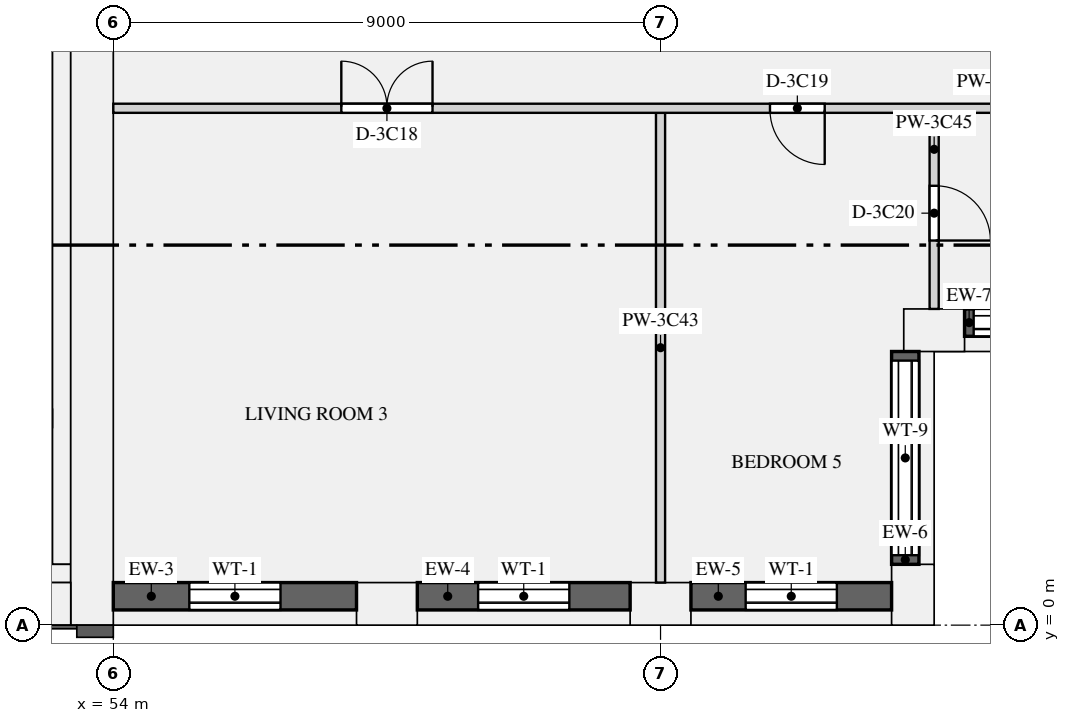
"""IFC4 building model, lengths in metres.
Left out: names, types, materials, properties, quantities, classifications, styles, units other than length and angle.
Written with IfcOpenShell. Run it as: python <this file> out.ifc"""

import sys

from ifc_helpers import new_model, si_unit, direction, frame, frame_2d, origin, origin_2d, place, context, subcontext, project, spatial, rectangle, extrude, element, fill, save


model = new_model("IFC4")
c1 = context("Model", 3, precision=1e-05, world=origin(), true_north=direction((0.0, 1.0)))
c2 = subcontext(c1, "Body", "Model", "MODEL_VIEW")
j1 = project(units=[si_unit("LENGTHUNIT", "METRE"), si_unit("PLANEANGLEUNIT", "RADIAN")], contexts=[c1])
p1 = place(None, origin())
s1 = spatial("IfcSite", under=j1, at=p1, CompositionType="ELEMENT")
p2 = place(p1, origin())
s2 = spatial("IfcBuilding", under=s1, at=p2, CompositionType="ELEMENT")
p3 = place(p2, frame((0.0, 0.0, 160.2)))
s3 = spatial("IfcBuildingStorey", under=s2, at=p3, CompositionType="ELEMENT", Elevation=160.2)
for number, where, z_axis, x_axis in (
    (1, (58.5, 0.35, 0.0), (0.0, 0.0, 1.0), (1.0, 0.0, 0.0)),
    (2, (63.0, 0.35, 0.0), (0.0, 0.0, 1.0), (1.0, 0.0, 0.0)),
    (3, (67.15, 0.5, 0.0), (0.0, 0.0, 1.0), (0.0, 1.0, 0.0)),
    (4, (67.5, 4.85, 0.0), (0.0, 0.0, 1.0), (1.0, 0.0, 0.0)),
):
    element("IfcColumn", number, at=place(p3, frame(where, z_axis=z_axis, x_axis=x_axis)), inside=s3, PredefinedType="USERDEFINED", context=c2, shape_type="SweptSolid", body=[
        extrude(rectangle(XDim=1.0, YDim=0.7, at=origin_2d()), origin(), (0.0, 0.0, 1.0), 3.15),
    ])
p4 = place(p3, frame((53.65, 0.0, 0.0), z_axis=(0.0, 0.0, 1.0), x_axis=(0.0, 1.0, 0.0)))
e5 = element("IfcWall", 5, at=p4, inside=s3, PredefinedType="SHEAR", context=c2, shape_type="SweptSolid", body=[
    extrude(rectangle(XDim=12.5, YDim=0.7, at=frame_2d((6.25, 0.0))), origin(), (0.0, 0.0, 1.0), 3.15),
])
p5 = place(p3, frame((18.7, 0.35, 0.0), z_axis=(0.0, 0.0, 1.0), x_axis=(1.0, 0.0, 0.0)))
e6 = element("IfcWall", 6, at=p5, inside=s3, PredefinedType="SHEAR", context=c2, shape_type="SweptSolid", body=[
    extrude(rectangle(XDim=34.6, YDim=0.7, at=frame_2d((17.3, 0.0))), origin(), (0.0, 0.0, 1.0), 3.15),
])
p6 = place(p3, frame((53.15, 1.0, 0.0), z_axis=(0.0, 0.0, 1.0), x_axis=(0.0, 1.0, 0.0)))
e7 = element("IfcWall", 7, at=p6, inside=s3, PredefinedType="SHEAR", context=c2, shape_type="SweptSolid", body=[
    extrude(rectangle(XDim=10.9, YDim=0.3, at=frame_2d((5.45, 0.0))), origin(), (0.0, 0.0, 1.0), 3.15),
])
p7 = place(p3, frame((18.7, 0.85, 0.0), z_axis=(0.0, 0.0, 1.0), x_axis=(1.0, 0.0, 0.0)))
e8 = element("IfcWall", 8, at=p7, inside=s3, PredefinedType="SHEAR", context=c2, shape_type="SweptSolid", body=[
    extrude(rectangle(XDim=34.6, YDim=0.3, at=frame_2d((17.3, 0.0))), origin(), (0.0, 0.0, 1.0), 3.15),
])
p8 = place(p3, frame((54.0, 0.475, 0.9), z_axis=(0.0, 0.0, 1.0), x_axis=(1.0, 0.0, 0.0)))
e9 = element("IfcWall", 9, at=p8, inside=s3, PredefinedType="SOLIDWALL", context=c2, shape_type="SweptSolid", body=[
    extrude(rectangle(XDim=4.0, YDim=0.45, at=frame_2d((2.0, 0.0))), origin(), (0.0, 0.0, 1.0), 1.93),
])
p9 = place(p8, frame((1.25, 0.0, 0.15)))
e10 = element("IfcOpeningElement", 10, at=p9, cuts=e9, PredefinedType="OPENING", context=c2, shape_type="SweptSolid", body=[
    extrude(rectangle(XDim=1.5, YDim=1.5, at=frame_2d((0.75, 0.75))), frame((0.0, 0.235, 0.0), z_axis=(0.0, -1.0, 0.0), x_axis=(1.0, 0.0, 0.0)), (0.0, 0.0, 1.0), 0.47),
])
p10 = place(p3, frame((59.0, 0.475, 0.9), z_axis=(0.0, 0.0, 1.0), x_axis=(1.0, 0.0, 0.0)))
e11 = element("IfcWall", 11, at=p10, inside=s3, PredefinedType="SOLIDWALL", context=c2, shape_type="SweptSolid", body=[
    extrude(rectangle(XDim=3.5, YDim=0.45, at=frame_2d((1.75, 0.0))), origin(), (0.0, 0.0, 1.0), 1.93),
])
p11 = place(p10, frame((1.0, 0.0, 0.15)))
e12 = element("IfcOpeningElement", 12, at=p11, cuts=e11, PredefinedType="OPENING", context=c2, shape_type="SweptSolid", body=[
    extrude(rectangle(XDim=1.5, YDim=1.5, at=frame_2d((0.75, 0.75))), frame((0.0, 0.235, 0.0), z_axis=(0.0, -1.0, 0.0), x_axis=(1.0, 0.0, 0.0)), (0.0, 0.0, 1.0), 0.47),
])
p12 = place(p3, frame((63.5, 0.475, 0.9), z_axis=(0.0, 0.0, 1.0), x_axis=(1.0, 0.0, 0.0)))
e13 = element("IfcWall", 13, at=p12, inside=s3, PredefinedType="SOLIDWALL", context=c2, shape_type="SweptSolid", body=[
    extrude(rectangle(XDim=3.3, YDim=0.45, at=frame_2d((1.65, 0.0))), origin(), (0.0, 0.0, 1.0), 1.93),
])
p13 = place(p12, frame((0.9, 0.0, 0.15)))
e14 = element("IfcOpeningElement", 14, at=p13, cuts=e13, PredefinedType="OPENING", context=c2, shape_type="SweptSolid", body=[
    extrude(rectangle(XDim=1.5, YDim=1.5, at=frame_2d((0.75, 0.75))), frame((0.0, 0.235, 0.0), z_axis=(0.0, -1.0, 0.0), x_axis=(1.0, 0.0, 0.0)), (0.0, 0.0, 1.0), 0.47),
])
p14 = place(p3, frame((67.025, 1.0, 0.9), z_axis=(0.0, 0.0, 1.0), x_axis=(0.0, 1.0, 0.0)))
e15 = element("IfcWall", 15, at=p14, inside=s3, PredefinedType="SOLIDWALL", context=c2, shape_type="SweptSolid", body=[
    extrude(rectangle(XDim=3.5, YDim=0.45, at=frame_2d((1.75, 0.0))), origin(), (0.0, 0.0, 1.0), 1.93),
])
p15 = place(p14, frame((0.15, 0.0, 0.15)))
e16 = element("IfcOpeningElement", 16, at=p15, cuts=e15, PredefinedType="OPENING", context=c2, shape_type="SweptSolid", body=[
    extrude(rectangle(XDim=3.2, YDim=1.5, at=frame_2d((1.6, 0.75))), frame((0.0, 0.235, 0.0), z_axis=(0.0, -1.0, 0.0), x_axis=(1.0, 0.0, 0.0)), (0.0, 0.0, 1.0), 0.47),
])
p16 = place(p3, frame((68.0, 4.975, 0.9), z_axis=(0.0, 0.0, 1.0), x_axis=(1.0, 0.0, 0.0)))
e17 = element("IfcWall", 17, at=p16, inside=s3, PredefinedType="SOLIDWALL", context=c2, shape_type="SweptSolid", body=[
    extrude(rectangle(XDim=3.3, YDim=0.45, at=frame_2d((1.65, 0.0))), origin(), (0.0, 0.0, 1.0), 1.93),
])
p17 = place(p16, frame((0.15, 0.0, 0.15)))
e18 = element("IfcOpeningElement", 18, at=p17, cuts=e17, PredefinedType="OPENING", context=c2, shape_type="SweptSolid", body=[
    extrude(rectangle(XDim=3.0, YDim=1.5, at=frame_2d((1.5, 0.75))), frame((0.0, 0.235, 0.0), z_axis=(0.0, -1.0, 0.0), x_axis=(1.0, 0.0, 0.0)), (0.0, 0.0, 1.0), 0.47),
])
p18 = place(p3, frame((54.0, 8.5, 0.0), z_axis=(0.0, 0.0, 1.0), x_axis=(1.0, 0.0, 0.0)))
e19 = element("IfcWall", 19, at=p18, inside=s3, PredefinedType="PARTITIONING", context=c2, shape_type="SweptSolid", body=[
    extrude(rectangle(XDim=17.3, YDim=0.15, at=frame_2d((8.65, 0.0))), origin(), (0.0, 0.0, 1.0), 2.83),
])
p19 = place(p18, frame((3.75, 0.0, 0.0)))
e20 = element("IfcOpeningElement", 20, at=p19, cuts=e19, PredefinedType="OPENING", context=c2, shape_type="SweptSolid", body=[
    extrude(rectangle(XDim=1.5, YDim=2.1, at=frame_2d((0.75, 1.05))), frame((0.0, 0.085, 0.0), z_axis=(0.0, -1.0, 0.0), x_axis=(1.0, 0.0, 0.0)), (0.0, 0.0, 1.0), 0.17),
])
p20 = place(p18, frame((10.8, 0.0, 0.0)))
e21 = element("IfcOpeningElement", 21, at=p20, cuts=e19, PredefinedType="OPENING", context=c2, shape_type="SweptSolid", body=[
    extrude(rectangle(XDim=0.9, YDim=2.1, at=frame_2d((0.45, 1.05))), frame((0.0, 0.085, 0.0), z_axis=(0.0, -1.0, 0.0), x_axis=(1.0, 0.0, 0.0)), (0.0, 0.0, 1.0), 0.17),
])
p21 = place(p3, frame((63.0, 0.7, 0.0), z_axis=(0.0, 0.0, 1.0), x_axis=(0.0, 1.0, 0.0)))
e22 = element("IfcWall", 22, at=p21, inside=s3, PredefinedType="PARTITIONING", context=c2, shape_type="SweptSolid", body=[
    extrude(rectangle(XDim=7.725, YDim=0.15, at=frame_2d((3.863, 0.0))), origin(), (0.0, 0.0, 1.0), 2.83),
])
p22 = place(p3, frame((67.5, 5.2, 0.0), z_axis=(0.0, 0.0, 1.0), x_axis=(0.0, 1.0, 0.0)))
e23 = element("IfcWall", 23, at=p22, inside=s3, PredefinedType="PARTITIONING", context=c2, shape_type="SweptSolid", body=[
    extrude(rectangle(XDim=3.225, YDim=0.15, at=frame_2d((1.613, 0.0))), origin(), (0.0, 0.0, 1.0), 2.83),
])
p23 = place(p22, frame((1.125, 0.0, 0.0)))
e24 = element("IfcOpeningElement", 24, at=p23, cuts=e23, PredefinedType="OPENING", context=c2, shape_type="SweptSolid", body=[
    extrude(rectangle(XDim=0.9, YDim=2.1, at=frame_2d((0.45, 1.05))), frame((0.0, 0.085, 0.0), z_axis=(0.0, -1.0, 0.0), x_axis=(1.0, 0.0, 0.0)), (0.0, 0.0, 1.0), 0.17),
])
p24 = place(p9, origin())
e25 = element("IfcWindow", 25, at=p24, inside=s3, PartitioningType="SINGLE_PANEL", PredefinedType="WINDOW", context=c2, shape_type="SweptSolid", body=[
    extrude(rectangle(XDim=1.5, YDim=1.5, at=frame_2d((0.75, 0.75))), frame((0.0, -0.065, 0.0), z_axis=(0.0, -1.0, 0.0), x_axis=(1.0, 0.0, 0.0)), (0.0, 0.0, 1.0), 0.06),
])
fill(e10, e25)
p25 = place(p11, origin())
e26 = element("IfcWindow", 26, at=p25, inside=s3, PartitioningType="SINGLE_PANEL", PredefinedType="WINDOW", context=c2, shape_type="SweptSolid", body=[
    extrude(rectangle(XDim=1.5, YDim=1.5, at=frame_2d((0.75, 0.75))), frame((0.0, -0.065, 0.0), z_axis=(0.0, -1.0, 0.0), x_axis=(1.0, 0.0, 0.0)), (0.0, 0.0, 1.0), 0.06),
])
fill(e12, e26)
p26 = place(p13, origin())
e27 = element("IfcWindow", 27, at=p26, inside=s3, PartitioningType="SINGLE_PANEL", PredefinedType="WINDOW", context=c2, shape_type="SweptSolid", body=[
    extrude(rectangle(XDim=1.5, YDim=1.5, at=frame_2d((0.75, 0.75))), frame((0.0, -0.065, 0.0), z_axis=(0.0, -1.0, 0.0), x_axis=(1.0, 0.0, 0.0)), (0.0, 0.0, 1.0), 0.06),
])
fill(e14, e27)
p27 = place(p15, origin())
e28 = element("IfcWindow", 28, at=p27, inside=s3, PartitioningType="SINGLE_PANEL", PredefinedType="WINDOW", context=c2, shape_type="SweptSolid", body=[
    extrude(rectangle(XDim=3.2, YDim=1.5, at=frame_2d((1.6, 0.75))), frame((0.0, -0.065, 0.0), z_axis=(0.0, -1.0, 0.0), x_axis=(1.0, 0.0, 0.0)), (0.0, 0.0, 1.0), 0.06),
])
fill(e16, e28)
p28 = place(p17, origin())
e29 = element("IfcWindow", 29, at=p28, inside=s3, PartitioningType="SINGLE_PANEL", PredefinedType="WINDOW", context=c2, shape_type="SweptSolid", body=[
    extrude(rectangle(XDim=3.0, YDim=1.5, at=frame_2d((1.5, 0.75))), frame((0.0, -0.065, 0.0), z_axis=(0.0, -1.0, 0.0), x_axis=(1.0, 0.0, 0.0)), (0.0, 0.0, 1.0), 0.06),
])
fill(e18, e29)
p29 = place(p19, origin())
e30 = element("IfcDoor", 30, at=p29, inside=s3, OperationType="DOUBLE_DOOR_SINGLE_SWING", PredefinedType="DOOR", context=c2, shape_type="SweptSolid", body=[
    extrude(rectangle(XDim=1.5, YDim=2.1, at=frame_2d((0.75, 1.05))), frame((0.0, 0.025, 0.0), z_axis=(0.0, -1.0, 0.0), x_axis=(1.0, 0.0, 0.0)), (0.0, 0.0, 1.0), 0.05),
])
fill(e20, e30)
p30 = place(p20, frame((0.9, 0.0, 0.0), z_axis=(0.0, 0.0, 1.0), x_axis=(-1.0, 0.0, 0.0)))
e31 = element("IfcDoor", 31, at=p30, inside=s3, OperationType="SINGLE_SWING_LEFT", PredefinedType="DOOR", context=c2, shape_type="SweptSolid", body=[
    extrude(rectangle(XDim=0.9, YDim=2.1, at=frame_2d((0.45, 1.05))), frame((0.0, 0.025, 0.0), z_axis=(0.0, -1.0, 0.0), x_axis=(1.0, 0.0, 0.0)), (0.0, 0.0, 1.0), 0.05),
])
fill(e21, e31)
p31 = place(p23, frame((0.9, 0.0, 0.0), z_axis=(0.0, 0.0, 1.0), x_axis=(-1.0, 0.0, 0.0)))
e32 = element("IfcDoor", 32, at=p31, inside=s3, OperationType="SINGLE_SWING_RIGHT", PredefinedType="DOOR", context=c2, shape_type="SweptSolid", body=[
    extrude(rectangle(XDim=0.9, YDim=2.1, at=frame_2d((0.45, 1.05))), frame((0.0, 0.025, 0.0), z_axis=(0.0, -1.0, 0.0), x_axis=(1.0, 0.0, 0.0)), (0.0, 0.0, 1.0), 0.05),
])
fill(e24, e32)
save(model, sys.argv[1])
